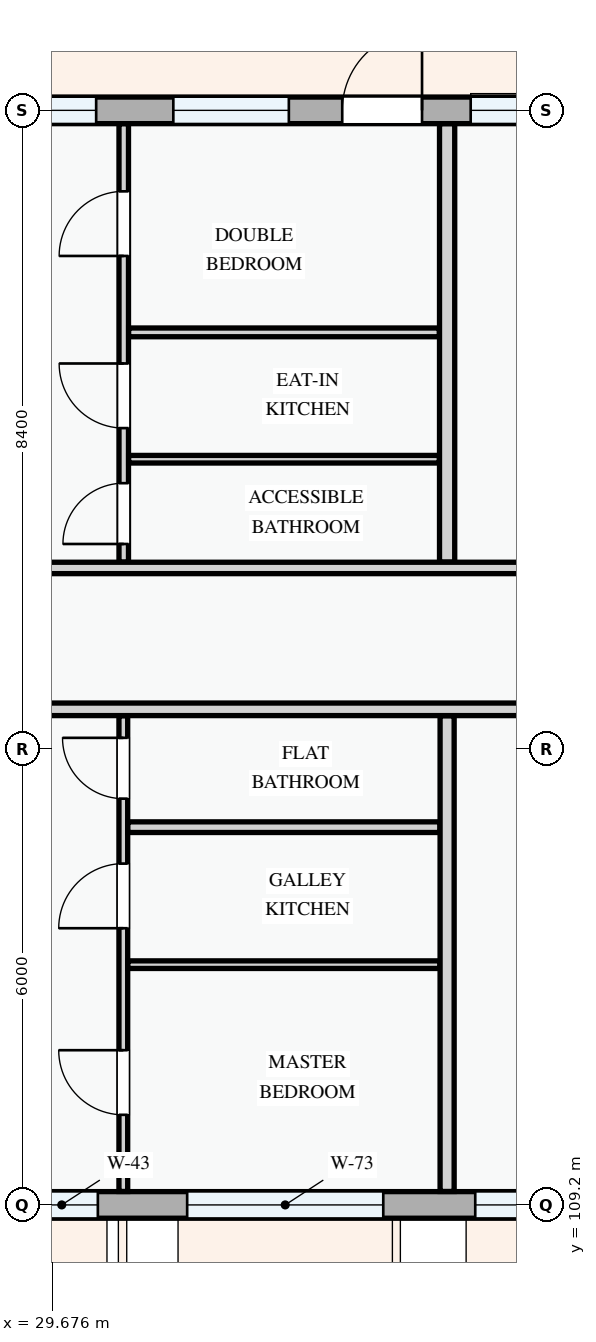
"""IFC4 building model, lengths in metres.
Left out: names, types, materials, properties, quantities, classifications, styles, units other than length and angle.
Written with IfcOpenShell. Run it as: python <this file> out.ifc"""

import sys

from ifc_helpers import new_model, si_unit, direction, frame, frame_2d, origin, place, context, subcontext, project, spatial, rectangle, extrude, element, fill, save


model = new_model("IFC4")
c1 = context("Model", 3, precision=1e-05, world=origin(), true_north=direction((0.0, 1.0)))
c2 = subcontext(c1, "Body", "Model", "MODEL_VIEW")
j1 = project(units=[si_unit("LENGTHUNIT", "METRE"), si_unit("PLANEANGLEUNIT", "RADIAN")], contexts=[c1])
p1 = place(None, origin())
s1 = spatial("IfcSite", under=j1, at=p1, CompositionType="ELEMENT")
p2 = place(p1, origin())
s2 = spatial("IfcBuilding", under=s1, at=p2, CompositionType="ELEMENT")
p3 = place(p2, frame((0.0, 0.0, 14.7)))
s3 = spatial("IfcBuildingStorey", under=s2, at=p3, CompositionType="ELEMENT", Elevation=14.7)
p4 = place(p3, frame((28.8, 109.2, 0.0), z_axis=(0.0, 0.0, 1.0), x_axis=(1.0, 0.0, 0.0)))
e1 = element("IfcWall", 1, at=p4, inside=s3, PredefinedType="STANDARD", context=c2, shape_type="SweptSolid", body=[
    extrude(rectangle(XDim=8.4, YDim=0.35, at=frame_2d((4.2, 0.0))), origin(), (0.0, 0.0, 1.0), 2.375),
])
p5 = place(p4, frame((0.525, 0.0, 0.78)))
e2 = element("IfcOpeningElement", 2, at=p5, cuts=e1, PredefinedType="OPENING", context=c2, shape_type="SweptSolid", body=[
    extrude(rectangle(XDim=0.95, YDim=1.15, at=frame_2d((0.475, 0.575))), frame((0.0, 0.185, 0.0), z_axis=(0.0, -1.0, 0.0), x_axis=(1.0, 0.0, 0.0)), (0.0, 0.0, 1.0), 0.37),
])
p6 = place(p4, frame((2.65, 0.0, 0.78)))
e3 = element("IfcOpeningElement", 3, at=p6, cuts=e1, PredefinedType="OPENING", context=c2, shape_type="SweptSolid", body=[
    extrude(rectangle(XDim=2.58, YDim=1.48, at=frame_2d((1.29, 0.74))), frame((0.0, 0.185, 0.0), z_axis=(0.0, -1.0, 0.0), x_axis=(1.0, 0.0, 0.0)), (0.0, 0.0, 1.0), 0.37),
])
p7 = place(p4, frame((6.44, 0.0, 0.78)))
e4 = element("IfcOpeningElement", 4, at=p7, cuts=e1, PredefinedType="OPENING", context=c2, shape_type="SweptSolid", body=[
    extrude(rectangle(XDim=1.4, YDim=1.45, at=frame_2d((0.7, 0.725))), frame((0.0, 0.185, 0.0), z_axis=(0.0, -1.0, 0.0), x_axis=(1.0, 0.0, 0.0)), (0.0, 0.0, 1.0), 0.37),
])
p8 = place(p3, frame((37.2, 123.6, 0.0), z_axis=(0.0, 0.0, 1.0), x_axis=(-1.0, 0.0, 0.0)))
e5 = element("IfcWall", 5, at=p8, inside=s3, PredefinedType="STANDARD", context=c2, shape_type="SweptSolid", body=[
    extrude(rectangle(XDim=8.4, YDim=0.35, at=frame_2d((4.2, 0.0))), origin(), (0.0, 0.0, 1.0), 2.345),
])
p9 = place(p8, frame((2.66, 0.0, 0.0)))
e6 = element("IfcOpeningElement", 6, at=p9, cuts=e5, PredefinedType="OPENING", context=c2, shape_type="SweptSolid", body=[
    extrude(rectangle(XDim=1.05, YDim=2.15, at=frame_2d((0.525, 1.075))), frame((0.0, 0.185, 0.0), z_axis=(0.0, -1.0, 0.0), x_axis=(1.0, 0.0, 0.0)), (0.0, 0.0, 1.0), 0.37),
])
p10 = place(p8, frame((0.5, 0.0, 0.78)))
e7 = element("IfcOpeningElement", 7, at=p10, cuts=e5, PredefinedType="OPENING", context=c2, shape_type="SweptSolid", body=[
    extrude(rectangle(XDim=1.52, YDim=1.42, at=frame_2d((0.76, 0.71))), frame((0.0, 0.185, 0.0), z_axis=(0.0, -1.0, 0.0), x_axis=(1.0, 0.0, 0.0)), (0.0, 0.0, 1.0), 0.37),
])
p11 = place(p8, frame((4.412, 0.0, 0.78)))
e8 = element("IfcOpeningElement", 8, at=p11, cuts=e5, PredefinedType="OPENING", context=c2, shape_type="SweptSolid", body=[
    extrude(rectangle(XDim=1.52, YDim=1.42, at=frame_2d((0.76, 0.71))), frame((0.0, 0.185, 0.0), z_axis=(0.0, -1.0, 0.0), x_axis=(1.0, 0.0, 0.0)), (0.0, 0.0, 1.0), 0.37),
])
p12 = place(p8, frame((6.947, 0.0, 0.78)))
e9 = element("IfcOpeningElement", 9, at=p12, cuts=e5, PredefinedType="OPENING", context=c2, shape_type="SweptSolid", body=[
    extrude(rectangle(XDim=0.9, YDim=1.2, at=frame_2d((0.45, 0.6))), frame((0.0, 0.185, 0.0), z_axis=(0.0, -1.0, 0.0), x_axis=(1.0, 0.0, 0.0)), (0.0, 0.0, 1.0), 0.37),
])
p13 = place(p3, frame((30.61, 109.377, 0.0), z_axis=(0.0, 0.0, 1.0), x_axis=(0.0, 1.0, 0.0)))
e10 = element("IfcWall", 10, at=p13, inside=s3, PredefinedType="PARTITIONING", context=c2, shape_type="SweptSolid", body=[
    extrude(rectangle(XDim=6.259, YDim=0.115, at=frame_2d((3.129, 0.0))), origin(), (0.0, 0.0, 1.0), 3.0),
])
p14 = place(p13, frame((1.008, 0.0, 0.0)))
e11 = element("IfcOpeningElement", 11, at=p14, cuts=e10, PredefinedType="OPENING", context=c2, shape_type="SweptSolid", body=[
    extrude(rectangle(XDim=0.85, YDim=2.1, at=frame_2d((0.425, 1.05))), frame((0.0, 0.067, 0.0), z_axis=(0.0, -1.0, 0.0), x_axis=(1.0, 0.0, 0.0)), (0.0, 0.0, 1.0), 0.135),
])
p15 = place(p13, frame((3.463, 0.0, 0.0)))
e12 = element("IfcOpeningElement", 12, at=p15, cuts=e10, PredefinedType="OPENING", context=c2, shape_type="SweptSolid", body=[
    extrude(rectangle(XDim=0.85, YDim=2.1, at=frame_2d((0.425, 1.05))), frame((0.0, 0.067, 0.0), z_axis=(0.0, -1.0, 0.0), x_axis=(1.0, 0.0, 0.0)), (0.0, 0.0, 1.0), 0.135),
])
p16 = place(p13, frame((5.168, 0.0, 0.0)))
e13 = element("IfcOpeningElement", 13, at=p16, cuts=e10, PredefinedType="OPENING", context=c2, shape_type="SweptSolid", body=[
    extrude(rectangle(XDim=0.8, YDim=2.1, at=frame_2d((0.4, 1.05))), frame((0.0, 0.067, 0.0), z_axis=(0.0, -1.0, 0.0), x_axis=(1.0, 0.0, 0.0)), (0.0, 0.0, 1.0), 0.135),
])
p17 = place(p3, frame((30.669, 112.361, 0.0), z_axis=(0.0, 0.0, 1.0), x_axis=(1.0, 0.0, 0.0)))
e14 = element("IfcWall", 14, at=p17, inside=s3, PredefinedType="PARTITIONING", context=c2, shape_type="SweptSolid", body=[
    extrude(rectangle(XDim=4.106, YDim=0.1, at=frame_2d((2.053, 0.0))), origin(), (0.0, 0.0, 1.0), 3.0),
])
p18 = place(p3, frame((30.669, 114.17, 0.0), z_axis=(0.0, 0.0, 1.0), x_axis=(1.0, 0.0, 0.0)))
e15 = element("IfcWall", 15, at=p18, inside=s3, PredefinedType="PARTITIONING", context=c2, shape_type="SweptSolid", body=[
    extrude(rectangle(XDim=4.106, YDim=0.14, at=frame_2d((2.053, 0.0))), origin(), (0.0, 0.0, 1.0), 3.0),
])
p19 = place(p3, frame((30.615, 117.657, 0.0), z_axis=(0.0, 0.0, 1.0), x_axis=(0.0, 1.0, 0.0)))
e16 = element("IfcWall", 16, at=p19, inside=s3, PredefinedType="PARTITIONING", context=c2, shape_type="SweptSolid", body=[
    extrude(rectangle(XDim=5.766, YDim=0.125, at=frame_2d((2.883, 0.0))), origin(), (0.0, 0.0, 1.0), 3.0),
])
p20 = place(p19, frame((0.238, 0.0, 0.0)))
e17 = element("IfcOpeningElement", 17, at=p20, cuts=e16, PredefinedType="OPENING", context=c2, shape_type="SweptSolid", body=[
    extrude(rectangle(XDim=0.8, YDim=2.1, at=frame_2d((0.4, 1.05))), frame((0.0, 0.073, 0.0), z_axis=(0.0, -1.0, 0.0), x_axis=(1.0, 0.0, 0.0)), (0.0, 0.0, 1.0), 0.145),
])
p21 = place(p19, frame((1.763, 0.0, 0.0)))
e18 = element("IfcOpeningElement", 18, at=p21, cuts=e16, PredefinedType="OPENING", context=c2, shape_type="SweptSolid", body=[
    extrude(rectangle(XDim=0.85, YDim=2.1, at=frame_2d((0.425, 1.05))), frame((0.0, 0.073, 0.0), z_axis=(0.0, -1.0, 0.0), x_axis=(1.0, 0.0, 0.0)), (0.0, 0.0, 1.0), 0.145),
])
p22 = place(p19, frame((4.028, 0.0, 0.0)))
e19 = element("IfcOpeningElement", 19, at=p22, cuts=e16, PredefinedType="OPENING", context=c2, shape_type="SweptSolid", body=[
    extrude(rectangle(XDim=0.85, YDim=2.1, at=frame_2d((0.425, 1.05))), frame((0.0, 0.073, 0.0), z_axis=(0.0, -1.0, 0.0), x_axis=(1.0, 0.0, 0.0)), (0.0, 0.0, 1.0), 0.145),
])
p23 = place(p3, frame((30.68, 120.679, 0.0), z_axis=(0.0, 0.0, 1.0), x_axis=(1.0, 0.0, 0.0)))
e20 = element("IfcWall", 20, at=p23, inside=s3, PredefinedType="PARTITIONING", context=c2, shape_type="SweptSolid", body=[
    extrude(rectangle(XDim=4.088, YDim=0.115, at=frame_2d((2.044, 0.0))), origin(), (0.0, 0.0, 1.0), 3.0),
])
p24 = place(p3, frame((30.68, 119.01, 0.0), z_axis=(0.0, 0.0, 1.0), x_axis=(1.0, 0.0, 0.0)))
e21 = element("IfcWall", 21, at=p24, inside=s3, PredefinedType="PARTITIONING", context=c2, shape_type="SweptSolid", body=[
    extrude(rectangle(XDim=4.088, YDim=0.1, at=frame_2d((2.044, 0.0))), origin(), (0.0, 0.0, 1.0), 3.0),
])
p25 = place(p3, frame((34.87, 109.377, 0.0), z_axis=(0.0, 0.0, 1.0), x_axis=(0.0, 1.0, 0.0)))
e22 = element("IfcWall", 22, at=p25, inside=s3, PredefinedType="PARTITIONING", context=c2, shape_type="SweptSolid", body=[
    extrude(rectangle(XDim=6.259, YDim=0.185, at=frame_2d((3.129, 0.0))), origin(), (0.0, 0.0, 1.0), 3.0),
])
p26 = place(p3, frame((34.87, 117.657, 0.0), z_axis=(0.0, 0.0, 1.0), x_axis=(0.0, 1.0, 0.0)))
e23 = element("IfcWall", 23, at=p26, inside=s3, PredefinedType="PARTITIONING", context=c2, shape_type="SweptSolid", body=[
    extrude(rectangle(XDim=5.766, YDim=0.2, at=frame_2d((2.883, 0.0))), origin(), (0.0, 0.0, 1.0), 3.0),
])
p27 = place(p3, frame((25.15, 115.72, 0.0), z_axis=(0.0, 0.0, 1.0), x_axis=(1.0, 0.0, 0.0)))
e24 = element("IfcWall", 24, at=p27, inside=s3, PredefinedType="PARTITIONING", context=c2, shape_type="SweptSolid", body=[
    extrude(rectangle(XDim=32.273, YDim=0.165, at=frame_2d((16.137, 0.0))), origin(), (0.0, 0.0, 1.0), 3.0),
])
p28 = place(p27, frame((0.25, 0.0, 0.0)))
e25 = element("IfcOpeningElement", 25, at=p28, cuts=e24, PredefinedType="OPENING", context=c2, shape_type="SweptSolid", body=[
    extrude(rectangle(XDim=0.92, YDim=2.1, at=frame_2d((0.46, 1.05))), frame((0.0, 0.093, 0.0), z_axis=(0.0, -1.0, 0.0), x_axis=(1.0, 0.0, 0.0)), (0.0, 0.0, 1.0), 0.185),
])
p29 = place(p27, frame((14.015, 0.0, 0.0)))
e26 = element("IfcOpeningElement", 26, at=p29, cuts=e24, PredefinedType="OPENING", context=c2, shape_type="SweptSolid", body=[
    extrude(rectangle(XDim=0.92, YDim=2.1, at=frame_2d((0.46, 1.05))), frame((0.0, 0.093, 0.0), z_axis=(0.0, -1.0, 0.0), x_axis=(1.0, 0.0, 0.0)), (0.0, 0.0, 1.0), 0.185),
])
p30 = place(p27, frame((21.739, 0.0, 0.0)))
e27 = element("IfcOpeningElement", 27, at=p30, cuts=e24, PredefinedType="OPENING", context=c2, shape_type="SweptSolid", body=[
    extrude(rectangle(XDim=0.92, YDim=2.1, at=frame_2d((0.46, 1.05))), frame((0.0, 0.093, 0.0), z_axis=(0.0, -1.0, 0.0), x_axis=(1.0, 0.0, 0.0)), (0.0, 0.0, 1.0), 0.185),
])
p31 = place(p3, frame((22.66, 117.58, 0.0), z_axis=(0.0, 0.0, 1.0), x_axis=(1.0, 0.0, 0.0)))
e28 = element("IfcWall", 28, at=p31, inside=s3, PredefinedType="PARTITIONING", context=c2, shape_type="SweptSolid", body=[
    extrude(rectangle(XDim=34.763, YDim=0.15, at=frame_2d((17.382, 0.0))), origin(), (0.0, 0.0, 1.0), 3.0),
])
p32 = place(p31, frame((2.74, 0.0, 0.0)))
e29 = element("IfcOpeningElement", 29, at=p32, cuts=e28, PredefinedType="OPENING", context=c2, shape_type="SweptSolid", body=[
    extrude(rectangle(XDim=0.96, YDim=2.12, at=frame_2d((0.48, 1.06))), frame((0.0, 0.085, 0.0), z_axis=(0.0, -1.0, 0.0), x_axis=(1.0, 0.0, 0.0)), (0.0, 0.0, 1.0), 0.17),
])
p33 = place(p31, frame((16.285, 0.0, 0.0)))
e30 = element("IfcOpeningElement", 30, at=p33, cuts=e28, PredefinedType="OPENING", context=c2, shape_type="SweptSolid", body=[
    extrude(rectangle(XDim=0.92, YDim=2.1, at=frame_2d((0.46, 1.05))), frame((0.0, 0.085, 0.0), z_axis=(0.0, -1.0, 0.0), x_axis=(1.0, 0.0, 0.0)), (0.0, 0.0, 1.0), 0.17),
])
p34 = place(p31, frame((24.263, 0.0, 0.0)))
e31 = element("IfcOpeningElement", 31, at=p34, cuts=e28, PredefinedType="OPENING", context=c2, shape_type="SweptSolid", body=[
    extrude(rectangle(XDim=0.92, YDim=2.1, at=frame_2d((0.46, 1.05))), frame((0.0, 0.085, 0.0), z_axis=(0.0, -1.0, 0.0), x_axis=(1.0, 0.0, 0.0)), (0.0, 0.0, 1.0), 0.17),
])
p35 = place(p5, origin())
e32 = element("IfcWindow", 32, at=p35, inside=s3, PartitioningType="SINGLE_PANEL", PredefinedType="WINDOW", context=c2, shape_type="SweptSolid", body=[
    extrude(rectangle(XDim=0.95, YDim=1.15, at=frame_2d((0.475, 0.575))), frame((0.0, 0.03, 0.0), z_axis=(0.0, -1.0, 0.0), x_axis=(1.0, 0.0, 0.0)), (0.0, 0.0, 1.0), 0.06),
])
fill(e2, e32)
p36 = place(p6, origin())
e33 = element("IfcWindow", 33, at=p36, inside=s3, PartitioningType="DOUBLE_PANEL_VERTICAL", PredefinedType="WINDOW", context=c2, shape_type="SweptSolid", body=[
    extrude(rectangle(XDim=2.58, YDim=1.48, at=frame_2d((1.29, 0.74))), frame((0.0, 0.03, 0.0), z_axis=(0.0, -1.0, 0.0), x_axis=(1.0, 0.0, 0.0)), (0.0, 0.0, 1.0), 0.06),
])
fill(e3, e33)
p37 = place(p7, origin())
e34 = element("IfcWindow", 34, at=p37, inside=s3, PartitioningType="SINGLE_PANEL", PredefinedType="WINDOW", context=c2, shape_type="SweptSolid", body=[
    extrude(rectangle(XDim=1.4, YDim=1.45, at=frame_2d((0.7, 0.725))), frame((0.0, 0.03, 0.0), z_axis=(0.0, -1.0, 0.0), x_axis=(1.0, 0.0, 0.0)), (0.0, 0.0, 1.0), 0.06),
])
fill(e4, e34)
p38 = place(p9, frame((1.05, 0.0, 0.0), z_axis=(0.0, 0.0, 1.0), x_axis=(-1.0, 0.0, 0.0)))
e35 = element("IfcDoor", 35, at=p38, inside=s3, OperationType="SINGLE_SWING_RIGHT", PredefinedType="DOOR", context=c2, shape_type="SweptSolid", body=[
    extrude(rectangle(XDim=1.05, YDim=2.15, at=frame_2d((0.525, 1.075))), frame((0.0, 0.025, 0.0), z_axis=(0.0, -1.0, 0.0), x_axis=(1.0, 0.0, 0.0)), (0.0, 0.0, 1.0), 0.05),
])
fill(e6, e35)
p39 = place(p10, origin())
e36 = element("IfcWindow", 36, at=p39, inside=s3, PartitioningType="SINGLE_PANEL", PredefinedType="WINDOW", context=c2, shape_type="SweptSolid", body=[
    extrude(rectangle(XDim=1.52, YDim=1.42, at=frame_2d((0.76, 0.71))), frame((0.0, 0.03, 0.0), z_axis=(0.0, -1.0, 0.0), x_axis=(1.0, 0.0, 0.0)), (0.0, 0.0, 1.0), 0.06),
])
fill(e7, e36)
p40 = place(p11, origin())
e37 = element("IfcWindow", 37, at=p40, inside=s3, PartitioningType="SINGLE_PANEL", PredefinedType="WINDOW", context=c2, shape_type="SweptSolid", body=[
    extrude(rectangle(XDim=1.52, YDim=1.42, at=frame_2d((0.76, 0.71))), frame((0.0, 0.03, 0.0), z_axis=(0.0, -1.0, 0.0), x_axis=(1.0, 0.0, 0.0)), (0.0, 0.0, 1.0), 0.06),
])
fill(e8, e37)
p41 = place(p12, origin())
e38 = element("IfcWindow", 38, at=p41, inside=s3, PartitioningType="SINGLE_PANEL", PredefinedType="WINDOW", context=c2, shape_type="SweptSolid", body=[
    extrude(rectangle(XDim=0.9, YDim=1.2, at=frame_2d((0.45, 0.6))), frame((0.0, 0.03, 0.0), z_axis=(0.0, -1.0, 0.0), x_axis=(1.0, 0.0, 0.0)), (0.0, 0.0, 1.0), 0.06),
])
fill(e9, e38)
p42 = place(p14, origin())
e39 = element("IfcDoor", 39, at=p42, inside=s3, OperationType="SINGLE_SWING_RIGHT", PredefinedType="DOOR", context=c2, shape_type="SweptSolid", body=[
    extrude(rectangle(XDim=0.85, YDim=2.1, at=frame_2d((0.425, 1.05))), frame((0.0, 0.025, 0.0), z_axis=(0.0, -1.0, 0.0), x_axis=(1.0, 0.0, 0.0)), (0.0, 0.0, 1.0), 0.05),
])
fill(e11, e39)
p43 = place(p15, origin())
e40 = element("IfcDoor", 40, at=p43, inside=s3, OperationType="SINGLE_SWING_LEFT", PredefinedType="DOOR", context=c2, shape_type="SweptSolid", body=[
    extrude(rectangle(XDim=0.85, YDim=2.1, at=frame_2d((0.425, 1.05))), frame((0.0, 0.025, 0.0), z_axis=(0.0, -1.0, 0.0), x_axis=(1.0, 0.0, 0.0)), (0.0, 0.0, 1.0), 0.05),
])
fill(e12, e40)
p44 = place(p16, origin())
e41 = element("IfcDoor", 41, at=p44, inside=s3, OperationType="SINGLE_SWING_RIGHT", PredefinedType="DOOR", context=c2, shape_type="SweptSolid", body=[
    extrude(rectangle(XDim=0.8, YDim=2.1, at=frame_2d((0.4, 1.05))), frame((0.0, 0.025, 0.0), z_axis=(0.0, -1.0, 0.0), x_axis=(1.0, 0.0, 0.0)), (0.0, 0.0, 1.0), 0.05),
])
fill(e13, e41)
p45 = place(p20, origin())
e42 = element("IfcDoor", 42, at=p45, inside=s3, OperationType="SINGLE_SWING_LEFT", PredefinedType="DOOR", context=c2, shape_type="SweptSolid", body=[
    extrude(rectangle(XDim=0.8, YDim=2.1, at=frame_2d((0.4, 1.05))), frame((0.0, 0.025, 0.0), z_axis=(0.0, -1.0, 0.0), x_axis=(1.0, 0.0, 0.0)), (0.0, 0.0, 1.0), 0.05),
])
fill(e17, e42)
p46 = place(p21, origin())
e43 = element("IfcDoor", 43, at=p46, inside=s3, OperationType="SINGLE_SWING_RIGHT", PredefinedType="DOOR", context=c2, shape_type="SweptSolid", body=[
    extrude(rectangle(XDim=0.85, YDim=2.1, at=frame_2d((0.425, 1.05))), frame((0.0, 0.025, 0.0), z_axis=(0.0, -1.0, 0.0), x_axis=(1.0, 0.0, 0.0)), (0.0, 0.0, 1.0), 0.05),
])
fill(e18, e43)
p47 = place(p22, origin())
e44 = element("IfcDoor", 44, at=p47, inside=s3, OperationType="SINGLE_SWING_LEFT", PredefinedType="DOOR", context=c2, shape_type="SweptSolid", body=[
    extrude(rectangle(XDim=0.85, YDim=2.1, at=frame_2d((0.425, 1.05))), frame((0.0, 0.025, 0.0), z_axis=(0.0, -1.0, 0.0), x_axis=(1.0, 0.0, 0.0)), (0.0, 0.0, 1.0), 0.05),
])
fill(e19, e44)
save(model, sys.argv[1])
